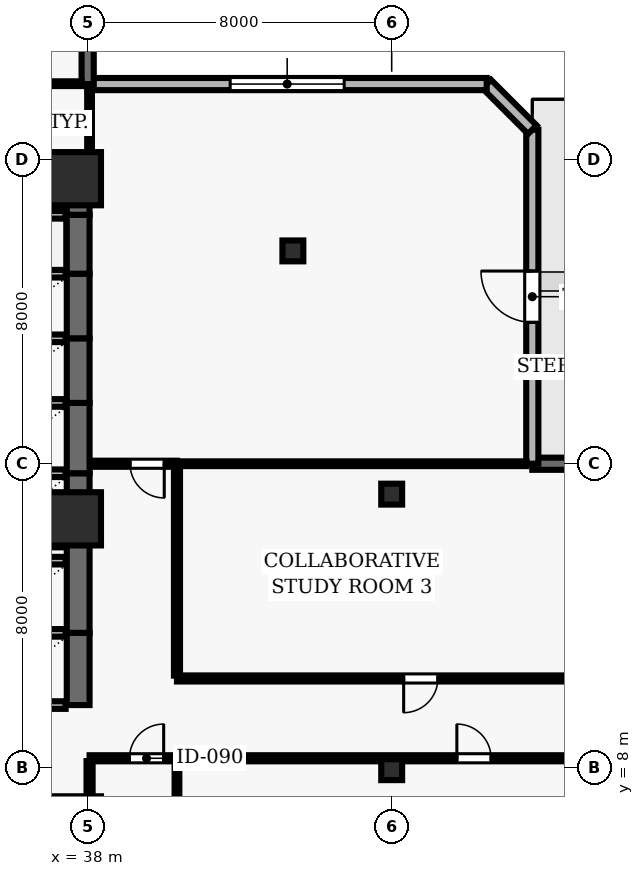
"""IFC4 building model, lengths in metres.
Left out: names, types, materials, properties, quantities, classifications, styles, units other than length and angle.
Written with IfcOpenShell. Run it as: python <this file> out.ifc"""

import sys

from ifc_helpers import new_model, si_unit, direction, frame, frame_2d, origin, origin_2d, place, context, subcontext, project, spatial, rectangle, hollow_rectangle, extrude, element, fill, save


model = new_model("IFC4")
c1 = context("Model", 3, precision=1e-05, world=origin(), true_north=direction((0.0, 1.0)))
c2 = subcontext(c1, "Body", "Model", "MODEL_VIEW")
j1 = project(units=[si_unit("LENGTHUNIT", "METRE"), si_unit("PLANEANGLEUNIT", "RADIAN")], contexts=[c1])
p1 = place(None, origin())
s1 = spatial("IfcSite", under=j1, at=p1, CompositionType="ELEMENT")
p2 = place(p1, origin())
s2 = spatial("IfcBuilding", under=s1, at=p2, CompositionType="ELEMENT")
p3 = place(p2, frame((0.0, 0.0, 70.0)))
s3 = spatial("IfcBuildingStorey", under=s2, at=p3, CompositionType="ELEMENT", Elevation=70.0)
for number, where, z_axis, x_axis in (
    (1, (37.65, 14.55, 0.0), (0.0, 0.0, 1.0), (1.0, 0.0, 0.0)),
    (2, (37.65, 23.5, 0.0), (0.0, 0.0, 1.0), (1.0, 0.0, 0.0)),
):
    element("IfcColumn", number, at=place(p3, frame(where, z_axis=z_axis, x_axis=x_axis)), inside=s3, PredefinedType="COLUMN", context=c2, shape_type="SweptSolid", body=[
        extrude(rectangle(XDim=1.4, YDim=1.4, at=origin_2d()), origin(), (0.0, 0.0, 1.0), 3.9),
    ])
for number, where, z_axis, x_axis in (
    (3, (46.0, 7.95, 0.0), (0.0, 0.0, 1.0), (1.0, 0.0, 0.0)),
    (4, (46.0, 15.2, 0.0), (0.0, 0.0, 1.0), (1.0, 0.0, 0.0)),
    (5, (43.4, 21.6, 0.0), (0.0, 0.0, 1.0), (1.0, 0.0, 0.0)),
):
    element("IfcColumn", number, at=place(p3, frame(where, z_axis=z_axis, x_axis=x_axis)), inside=s3, PredefinedType="COLUMN", context=c2, shape_type="SweptSolid", body=[
        extrude(hollow_rectangle(XDim=0.55, YDim=0.55, WallThickness=0.025, at=origin_2d()), origin(), (0.0, 0.0, 1.0), 3.9),
    ])
p4 = place(p3, frame((73.5, 16.0, 0.0), z_axis=(0.0, 0.0, 1.0), x_axis=(-1.0, 0.0, 0.0)))
e6 = element("IfcWall", 6, at=p4, inside=s3, PredefinedType="SOLIDWALL", context=c2, shape_type="SweptSolid", body=[
    extrude(rectangle(XDim=23.8, YDim=0.32, at=frame_2d((11.9, 0.0))), origin(), (0.0, 0.0, 1.0), 3.69),
])
p5 = place(p4, frame((12.775, 0.0, 0.0)))
e7 = element("IfcOpeningElement", 7, at=p5, cuts=e6, PredefinedType="OPENING", context=c2, shape_type="SweptSolid", body=[
    extrude(rectangle(XDim=1.0, YDim=2.2, at=frame_2d((0.5, 1.1))), frame((0.0, 0.17, 0.0), z_axis=(0.0, -1.0, 0.0), x_axis=(1.0, 0.0, 0.0)), (0.0, 0.0, 1.0), 0.34),
])
p6 = place(p4, frame((1.575, 0.0, 0.9)))
e8 = element("IfcOpeningElement", 8, at=p6, cuts=e6, PredefinedType="OPENING", context=c2, shape_type="SweptSolid", body=[
    extrude(rectangle(XDim=2.8, YDim=1.8, at=frame_2d((1.4, 0.9))), frame((0.0, 0.17, 0.0), z_axis=(0.0, -1.0, 0.0), x_axis=(1.0, 0.0, 0.0)), (0.0, 0.0, 1.0), 0.34),
])
p7 = place(p3, frame((49.7, 16.0, 0.0), z_axis=(0.0, 0.0, 1.0), x_axis=(0.0, 1.0, 0.0)))
e9 = element("IfcWall", 9, at=p7, inside=s3, PredefinedType="SOLIDWALL", context=c2, shape_type="SweptSolid", body=[
    extrude(rectangle(XDim=8.79, YDim=0.32, at=frame_2d((4.395, 0.0))), origin(), (0.0, 0.0, 1.0), 3.69),
])
p8 = place(p7, frame((3.72, 0.0, 0.0)))
e10 = element("IfcOpeningElement", 10, at=p8, cuts=e9, PredefinedType="OPENING", context=c2, shape_type="SweptSolid", body=[
    extrude(rectangle(XDim=1.35, YDim=2.2, at=frame_2d((0.675, 1.1))), frame((0.0, 0.17, 0.0), z_axis=(0.0, -1.0, 0.0), x_axis=(1.0, 0.0, 0.0)), (0.0, 0.0, 1.0), 0.34),
])
p9 = place(p3, frame((49.7, 24.79, 0.0), z_axis=(0.0, 0.0, 1.0), x_axis=(-0.707106781187, 0.707106781187, 0.0)))
e11 = element("IfcWall", 11, at=p9, inside=s3, PredefinedType="SOLIDWALL", context=c2, shape_type="SweptSolid", body=[
    extrude(rectangle(XDim=1.697, YDim=0.32, at=frame_2d((0.849, 0.0))), origin(), (0.0, 0.0, 1.0), 3.69),
])
p10 = place(p3, frame((48.5, 25.99, 0.0), z_axis=(0.0, 0.0, 1.0), x_axis=(-1.0, 0.0, 0.0)))
e12 = element("IfcWall", 12, at=p10, inside=s3, PredefinedType="SOLIDWALL", context=c2, shape_type="SweptSolid", body=[
    extrude(rectangle(XDim=10.5, YDim=0.32, at=frame_2d((5.25, 0.0))), origin(), (0.0, 0.0, 1.0), 3.69),
])
p11 = place(p10, frame((3.75, 0.0, 0.9)))
e13 = element("IfcOpeningElement", 13, at=p11, cuts=e12, PredefinedType="OPENING", context=c2, shape_type="SweptSolid", body=[
    extrude(rectangle(XDim=3.0, YDim=2.2, at=frame_2d((1.5, 1.1))), frame((0.0, 0.17, 0.0), z_axis=(0.0, -1.0, 0.0), x_axis=(1.0, 0.0, 0.0)), (0.0, 0.0, 1.0), 0.34),
])
p12 = place(p3, frame((38.0, 25.99, 0.0), z_axis=(0.0, 0.0, 1.0), x_axis=(0.0, 1.0, 0.0)))
e14 = element("IfcWall", 14, at=p12, inside=s3, PredefinedType="SOLIDWALL", context=c2, shape_type="SweptSolid", body=[
    extrude(rectangle(XDim=25.51, YDim=0.32, at=frame_2d((12.755, 0.0))), origin(), (0.0, 0.0, 1.0), 3.69),
])
p13 = place(p12, frame((12.681, 0.0, 0.0)))
e15 = element("IfcOpeningElement", 15, at=p13, cuts=e14, PredefinedType="OPENING", context=c2, shape_type="SweptSolid", body=[
    extrude(rectangle(XDim=1.0, YDim=2.2, at=frame_2d((0.5, 1.1))), frame((0.0, 0.17, 0.0), z_axis=(0.0, -1.0, 0.0), x_axis=(1.0, 0.0, 0.0)), (0.0, 0.0, 1.0), 0.34),
])
p14 = place(p12, frame((2.139, 0.0, 0.9)))
e16 = element("IfcOpeningElement", 16, at=p14, cuts=e14, PredefinedType="OPENING", context=c2, shape_type="SweptSolid", body=[
    extrude(rectangle(XDim=1.2, YDim=1.6, at=frame_2d((0.6, 0.8))), frame((0.0, 0.17, 0.0), z_axis=(0.0, -1.0, 0.0), x_axis=(1.0, 0.0, 0.0)), (0.0, 0.0, 1.0), 0.34),
])
p15 = place(p12, frame((8.066, 0.0, 0.9)))
e17 = element("IfcOpeningElement", 17, at=p15, cuts=e14, PredefinedType="OPENING", context=c2, shape_type="SweptSolid", body=[
    extrude(rectangle(XDim=1.2, YDim=1.6, at=frame_2d((0.6, 0.8))), frame((0.0, 0.17, 0.0), z_axis=(0.0, -1.0, 0.0), x_axis=(1.0, 0.0, 0.0)), (0.0, 0.0, 1.0), 0.34),
])
p16 = place(p12, frame((15.794, 0.0, 0.9)))
e18 = element("IfcOpeningElement", 18, at=p16, cuts=e14, PredefinedType="OPENING", context=c2, shape_type="SweptSolid", body=[
    extrude(rectangle(XDim=1.2, YDim=1.6, at=frame_2d((0.6, 0.8))), frame((0.0, 0.17, 0.0), z_axis=(0.0, -1.0, 0.0), x_axis=(1.0, 0.0, 0.0)), (0.0, 0.0, 1.0), 0.34),
])
p17 = place(p12, frame((21.721, 0.0, 0.9)))
e19 = element("IfcOpeningElement", 19, at=p17, cuts=e14, PredefinedType="OPENING", context=c2, shape_type="SweptSolid", body=[
    extrude(rectangle(XDim=1.2, YDim=1.6, at=frame_2d((0.6, 0.8))), frame((0.0, 0.17, 0.0), z_axis=(0.0, -1.0, 0.0), x_axis=(1.0, 0.0, 0.0)), (0.0, 0.0, 1.0), 0.34),
])
p18 = place(p3, frame((37.75, 9.65, 0.0), z_axis=(0.0, 0.0, 1.0), x_axis=(0.0, 1.0, 0.0)))
e20 = element("IfcWall", 20, at=p18, inside=s3, PredefinedType="SHEAR", context=c2, shape_type="SweptSolid", body=[
    extrude(rectangle(XDim=1.9, YDim=0.6, at=frame_2d((0.95, 0.0))), origin(), (0.0, 0.0, 1.0), 3.69),
])
for number, where, z_axis, x_axis in (
    (21, (35.28, 9.65, 0.0), (0.0, 0.0, 1.0), (1.0, 0.0, 0.0)),
    (22, (37.42, 11.55, 0.0), (0.0, 0.0, 1.0), (-1.0, 0.0, 0.0)),
):
    element("IfcWall", number, at=place(p3, frame(where, z_axis=z_axis, x_axis=x_axis)), inside=s3, PredefinedType="SOLIDWALL", context=c2, shape_type="SweptSolid", body=[
        extrude(rectangle(XDim=2.14, YDim=0.2, at=frame_2d((1.07, 0.0))), origin(), (0.0, 0.0, 1.0), 3.69),
    ])
p19 = place(p3, frame((37.75, 11.55, 0.0), z_axis=(0.0, 0.0, 1.0), x_axis=(0.0, 1.0, 0.0)))
e23 = element("IfcWall", 23, at=p19, inside=s3, PredefinedType="SHEAR", context=c2, shape_type="SweptSolid", body=[
    extrude(rectangle(XDim=2.35, YDim=0.6, at=frame_2d((1.175, 0.0))), origin(), (0.0, 0.0, 1.0), 3.69),
])
p20 = place(p3, frame((37.42, 13.45, 0.0), z_axis=(0.0, 0.0, 1.0), x_axis=(-1.0, 0.0, 0.0)))
e24 = element("IfcWall", 24, at=p20, inside=s3, PredefinedType="SOLIDWALL", context=c2, shape_type="SweptSolid", body=[
    extrude(rectangle(XDim=2.14, YDim=0.2, at=frame_2d((1.07, 0.0))), origin(), (0.0, 0.0, 1.0), 3.69),
])
p21 = place(p3, frame((37.75, 13.9, 0.0), z_axis=(0.0, 0.0, 1.0), x_axis=(0.0, 1.0, 0.0)))
e25 = element("IfcWall", 25, at=p21, inside=s3, PredefinedType="SHEAR", context=c2, shape_type="SweptSolid", body=[
    extrude(rectangle(XDim=1.85, YDim=0.6, at=frame_2d((0.925, 0.0))), origin(), (0.0, 0.0, 1.0), 3.69),
])
for number, where, z_axis, x_axis in (
    (26, (35.28, 13.9, 0.0), (0.0, 0.0, 1.0), (1.0, 0.0, 0.0)),
    (27, (37.42, 15.75, 0.0), (0.0, 0.0, 1.0), (-1.0, 0.0, 0.0)),
):
    element("IfcWall", number, at=place(p3, frame(where, z_axis=z_axis, x_axis=x_axis)), inside=s3, PredefinedType="SOLIDWALL", context=c2, shape_type="SweptSolid", body=[
        extrude(rectangle(XDim=2.14, YDim=0.2, at=frame_2d((1.07, 0.0))), origin(), (0.0, 0.0, 1.0), 3.69),
    ])
p22 = place(p3, frame((37.75, 15.75, 0.0), z_axis=(0.0, 0.0, 1.0), x_axis=(0.0, 1.0, 0.0)))
e28 = element("IfcWall", 28, at=p22, inside=s3, PredefinedType="SHEAR", context=c2, shape_type="SweptSolid", body=[
    extrude(rectangle(XDim=1.85, YDim=0.6, at=frame_2d((0.925, 0.0))), origin(), (0.0, 0.0, 1.0), 3.69),
])
p23 = place(p3, frame((37.42, 17.6, 0.0), z_axis=(0.0, 0.0, 1.0), x_axis=(-1.0, 0.0, 0.0)))
e29 = element("IfcWall", 29, at=p23, inside=s3, PredefinedType="SOLIDWALL", context=c2, shape_type="SweptSolid", body=[
    extrude(rectangle(XDim=2.14, YDim=0.2, at=frame_2d((1.07, 0.0))), origin(), (0.0, 0.0, 1.0), 3.69),
])
p24 = place(p3, frame((37.75, 17.6, 0.0), z_axis=(0.0, 0.0, 1.0), x_axis=(0.0, 1.0, 0.0)))
e30 = element("IfcWall", 30, at=p24, inside=s3, PredefinedType="SHEAR", context=c2, shape_type="SweptSolid", body=[
    extrude(rectangle(XDim=1.7, YDim=0.6, at=frame_2d((0.85, 0.0))), origin(), (0.0, 0.0, 1.0), 3.69),
])
p25 = place(p3, frame((37.42, 19.3, 0.0), z_axis=(0.0, 0.0, 1.0), x_axis=(-1.0, 0.0, 0.0)))
e31 = element("IfcWall", 31, at=p25, inside=s3, PredefinedType="SOLIDWALL", context=c2, shape_type="SweptSolid", body=[
    extrude(rectangle(XDim=2.14, YDim=0.2, at=frame_2d((1.07, 0.0))), origin(), (0.0, 0.0, 1.0), 3.69),
])
p26 = place(p3, frame((37.75, 19.3, 0.0), z_axis=(0.0, 0.0, 1.0), x_axis=(0.0, 1.0, 0.0)))
e32 = element("IfcWall", 32, at=p26, inside=s3, PredefinedType="SHEAR", context=c2, shape_type="SweptSolid", body=[
    extrude(rectangle(XDim=1.7, YDim=0.6, at=frame_2d((0.85, 0.0))), origin(), (0.0, 0.0, 1.0), 3.69),
])
p27 = place(p3, frame((37.42, 21.0, 0.0), z_axis=(0.0, 0.0, 1.0), x_axis=(-1.0, 0.0, 0.0)))
e33 = element("IfcWall", 33, at=p27, inside=s3, PredefinedType="SOLIDWALL", context=c2, shape_type="SweptSolid", body=[
    extrude(rectangle(XDim=2.14, YDim=0.2, at=frame_2d((1.07, 0.0))), origin(), (0.0, 0.0, 1.0), 3.69),
])
p28 = place(p3, frame((37.75, 21.0, 0.0), z_axis=(0.0, 0.0, 1.0), x_axis=(0.0, 1.0, 0.0)))
e34 = element("IfcWall", 34, at=p28, inside=s3, PredefinedType="SHEAR", context=c2, shape_type="SweptSolid", body=[
    extrude(rectangle(XDim=1.55, YDim=0.6, at=frame_2d((0.775, 0.0))), origin(), (0.0, 0.0, 1.0), 3.69),
])
p29 = place(p3, frame((37.42, 22.55, 0.0), z_axis=(0.0, 0.0, 1.0), x_axis=(-1.0, 0.0, 0.0)))
e35 = element("IfcWall", 35, at=p29, inside=s3, PredefinedType="SOLIDWALL", context=c2, shape_type="SweptSolid", body=[
    extrude(rectangle(XDim=2.14, YDim=0.2, at=frame_2d((1.07, 0.0))), origin(), (0.0, 0.0, 1.0), 3.69),
])
p30 = place(p3, frame((37.75, 22.55, 0.0), z_axis=(0.0, 0.0, 1.0), x_axis=(0.0, 1.0, 0.0)))
e36 = element("IfcWall", 36, at=p30, inside=s3, PredefinedType="SHEAR", context=c2, shape_type="SweptSolid", body=[
    extrude(rectangle(XDim=1.5, YDim=0.6, at=frame_2d((0.75, 0.0))), origin(), (0.0, 0.0, 1.0), 3.69),
])
p31 = place(p3, frame((37.42, 24.05, 0.0), z_axis=(0.0, 0.0, 1.0), x_axis=(-1.0, 0.0, 0.0)))
e37 = element("IfcWall", 37, at=p31, inside=s3, PredefinedType="SOLIDWALL", context=c2, shape_type="SweptSolid", body=[
    extrude(rectangle(XDim=2.14, YDim=0.2, at=frame_2d((1.07, 0.0))), origin(), (0.0, 0.0, 1.0), 3.69),
])
p32 = place(p3, frame((35.15, 26.0, 0.0), z_axis=(0.0, 0.0, 1.0), x_axis=(1.0, 0.0, 0.0)))
e38 = element("IfcWall", 38, at=p32, inside=s3, PredefinedType="PARTITIONING", context=c2, shape_type="SweptSolid", body=[
    extrude(rectangle(XDim=2.695, YDim=0.125, at=frame_2d((1.348, 0.0))), origin(), (0.0, 0.0, 1.0), 3.69),
])
p33 = place(p3, frame((38.05, 8.25, 0.0), z_axis=(0.0, 0.0, 1.0), x_axis=(1.0, 0.0, 0.0)))
e39 = element("IfcWall", 39, at=p33, inside=s3, PredefinedType="PARTITIONING", context=c2, shape_type="SweptSolid", body=[
    extrude(rectangle(XDim=2.3, YDim=0.16, at=frame_2d((1.15, 0.0))), origin(), (0.0, 0.0, 1.0), 2.995),
])
p34 = place(p33, frame((1.05, 0.0, 0.0)))
e40 = element("IfcOpeningElement", 40, at=p34, cuts=e39, PredefinedType="OPENING", context=c2, shape_type="SweptSolid", body=[
    extrude(rectangle(XDim=0.9, YDim=2.1, at=frame_2d((0.45, 1.05))), frame((0.0, 0.09, 0.0), z_axis=(0.0, -1.0, 0.0), x_axis=(1.0, 0.0, 0.0)), (0.0, 0.0, 1.0), 0.18),
])
p35 = place(p3, frame((40.35, 8.25, 0.0), z_axis=(0.0, 0.0, 1.0), x_axis=(1.0, 0.0, 0.0)))
e41 = element("IfcWall", 41, at=p35, inside=s3, PredefinedType="PARTITIONING", context=c2, shape_type="SweptSolid", body=[
    extrude(rectangle(XDim=12.83, YDim=0.16, at=frame_2d((6.415, 0.0))), origin(), (0.0, 0.0, 1.0), 2.995),
])
p36 = place(p35, frame((7.365, 0.0, 0.0)))
e42 = element("IfcOpeningElement", 42, at=p36, cuts=e41, PredefinedType="OPENING", context=c2, shape_type="SweptSolid", body=[
    extrude(rectangle(XDim=0.9, YDim=2.1, at=frame_2d((0.45, 1.05))), frame((0.0, 0.09, 0.0), z_axis=(0.0, -1.0, 0.0), x_axis=(1.0, 0.0, 0.0)), (0.0, 0.0, 1.0), 0.18),
])
p37 = place(p3, frame((40.35, 16.0, 0.0), z_axis=(0.0, 0.0, 1.0), x_axis=(1.0, 0.0, 0.0)))
e43 = element("IfcWall", 43, at=p37, inside=s3, PredefinedType="PARTITIONING", context=c2, shape_type="SweptSolid", body=[
    extrude(rectangle(XDim=9.195, YDim=0.125, at=frame_2d((4.597, 0.0))), origin(), (0.0, 0.0, 1.0), 3.69),
])
p38 = place(p3, frame((40.35, 16.0, 0.0), z_axis=(0.0, 0.0, 1.0), x_axis=(-1.0, 0.0, 0.0)))
e44 = element("IfcWall", 44, at=p38, inside=s3, PredefinedType="PARTITIONING", context=c2, shape_type="SweptSolid", body=[
    extrude(rectangle(XDim=2.27, YDim=0.16, at=frame_2d((1.135, 0.0))), origin(), (0.0, 0.0, 1.0), 3.69),
])
p39 = place(p38, frame((0.335, 0.0, 0.0)))
e45 = element("IfcOpeningElement", 45, at=p39, cuts=e44, PredefinedType="OPENING", context=c2, shape_type="SweptSolid", body=[
    extrude(rectangle(XDim=0.9, YDim=2.1, at=frame_2d((0.45, 1.05))), frame((0.0, 0.09, 0.0), z_axis=(0.0, -1.0, 0.0), x_axis=(1.0, 0.0, 0.0)), (0.0, 0.0, 1.0), 0.18),
])
p40 = place(p3, frame((53.18, 10.35, 0.0), z_axis=(0.0, 0.0, 1.0), x_axis=(-1.0, 0.0, 0.0)))
e46 = element("IfcWall", 46, at=p40, inside=s3, PredefinedType="PARTITIONING", context=c2, shape_type="SweptSolid", body=[
    extrude(rectangle(XDim=12.83, YDim=0.16, at=frame_2d((6.415, 0.0))), origin(), (0.0, 0.0, 1.0), 3.227),
])
p41 = place(p40, frame((5.965, 0.0, 0.0)))
e47 = element("IfcOpeningElement", 47, at=p41, cuts=e46, PredefinedType="OPENING", context=c2, shape_type="SweptSolid", body=[
    extrude(rectangle(XDim=0.9, YDim=2.1, at=frame_2d((0.45, 1.05))), frame((0.0, 0.09, 0.0), z_axis=(0.0, -1.0, 0.0), x_axis=(1.0, 0.0, 0.0)), (0.0, 0.0, 1.0), 0.18),
])
p42 = place(p3, frame((38.05, 7.05, 0.0), z_axis=(0.0, 0.0, 1.0), x_axis=(0.0, 1.0, 0.0)))
e48 = element("IfcWall", 48, at=p42, inside=s3, PredefinedType="PARTITIONING", context=c2, shape_type="SweptSolid", body=[
    extrude(rectangle(XDim=1.125, YDim=0.16, at=frame_2d((0.562, 0.0))), origin(), (0.0, 0.0, 1.0), 2.995),
])
p43 = place(p3, frame((38.05, 25.835, 0.0), z_axis=(0.0, 0.0, 1.0), x_axis=(0.0, -1.0, 0.0)))
e49 = element("IfcWall", 49, at=p43, inside=s3, PredefinedType="PARTITIONING", context=c2, shape_type="SweptSolid", body=[
    extrude(rectangle(XDim=1.785, YDim=0.125, at=frame_2d((0.893, 0.0))), origin(), (0.0, 0.0, 1.0), 2.995),
])
p44 = place(p3, frame((40.35, 0.09, 0.0), z_axis=(0.0, 0.0, 1.0), x_axis=(0.0, 1.0, 0.0)))
e50 = element("IfcWall", 50, at=p44, inside=s3, PredefinedType="PARTITIONING", context=c2, shape_type="SweptSolid", body=[
    extrude(rectangle(XDim=8.085, YDim=0.125, at=frame_2d((4.042, 0.0))), origin(), (0.0, 0.0, 1.0), 3.69),
])
p45 = place(p3, frame((40.35, 10.425, 0.0), z_axis=(0.0, 0.0, 1.0), x_axis=(0.0, 1.0, 0.0)))
e51 = element("IfcWall", 51, at=p45, inside=s3, PredefinedType="PARTITIONING", context=c2, shape_type="SweptSolid", body=[
    extrude(rectangle(XDim=5.5, YDim=0.16, at=frame_2d((2.75, 0.0))), origin(), (0.0, 0.0, 1.0), 3.227),
])
p46 = place(p8, origin())
e52 = element("IfcDoor", 52, at=p46, inside=s3, OperationType="SINGLE_SWING_RIGHT", PredefinedType="DOOR", context=c2, shape_type="SweptSolid", body=[
    extrude(rectangle(XDim=1.35, YDim=2.2, at=frame_2d((0.675, 1.1))), frame((0.0, 0.025, 0.0), z_axis=(0.0, -1.0, 0.0), x_axis=(1.0, 0.0, 0.0)), (0.0, 0.0, 1.0), 0.05),
])
fill(e10, e52)
p47 = place(p11, origin())
e53 = element("IfcWindow", 53, at=p47, inside=s3, PartitioningType="SINGLE_PANEL", PredefinedType="WINDOW", context=c2, shape_type="SweptSolid", body=[
    extrude(rectangle(XDim=3.0, YDim=2.2, at=frame_2d((1.5, 1.1))), frame((0.0, 0.03, 0.0), z_axis=(0.0, -1.0, 0.0), x_axis=(1.0, 0.0, 0.0)), (0.0, 0.0, 1.0), 0.06),
])
fill(e13, e53)
p48 = place(p34, origin())
e54 = element("IfcDoor", 54, at=p48, inside=s3, OperationType="SINGLE_SWING_RIGHT", PredefinedType="DOOR", context=c2, shape_type="SweptSolid", body=[
    extrude(rectangle(XDim=0.9, YDim=2.1, at=frame_2d((0.45, 1.05))), frame((0.0, 0.025, 0.0), z_axis=(0.0, -1.0, 0.0), x_axis=(1.0, 0.0, 0.0)), (0.0, 0.0, 1.0), 0.05),
])
fill(e40, e54)
p49 = place(p36, origin())
e55 = element("IfcDoor", 55, at=p49, inside=s3, OperationType="SINGLE_SWING_LEFT", PredefinedType="DOOR", context=c2, shape_type="SweptSolid", body=[
    extrude(rectangle(XDim=0.9, YDim=2.1, at=frame_2d((0.45, 1.05))), frame((0.0, 0.025, 0.0), z_axis=(0.0, -1.0, 0.0), x_axis=(1.0, 0.0, 0.0)), (0.0, 0.0, 1.0), 0.05),
])
fill(e42, e55)
p50 = place(p41, origin())
e56 = element("IfcDoor", 56, at=p50, inside=s3, OperationType="SINGLE_SWING_RIGHT", PredefinedType="DOOR", context=c2, shape_type="SweptSolid", body=[
    extrude(rectangle(XDim=0.9, YDim=2.1, at=frame_2d((0.45, 1.05))), frame((0.0, 0.025, 0.0), z_axis=(0.0, -1.0, 0.0), x_axis=(1.0, 0.0, 0.0)), (0.0, 0.0, 1.0), 0.05),
])
fill(e47, e56)
p51 = place(p39, origin())
e57 = element("IfcDoor", 57, at=p51, inside=s3, OperationType="SINGLE_SWING_LEFT", PredefinedType="DOOR", context=c2, shape_type="SweptSolid", body=[
    extrude(rectangle(XDim=0.9, YDim=2.1, at=frame_2d((0.45, 1.05))), frame((0.0, 0.025, 0.0), z_axis=(0.0, -1.0, 0.0), x_axis=(1.0, 0.0, 0.0)), (0.0, 0.0, 1.0), 0.05),
])
fill(e45, e57)
save(model, sys.argv[1])
